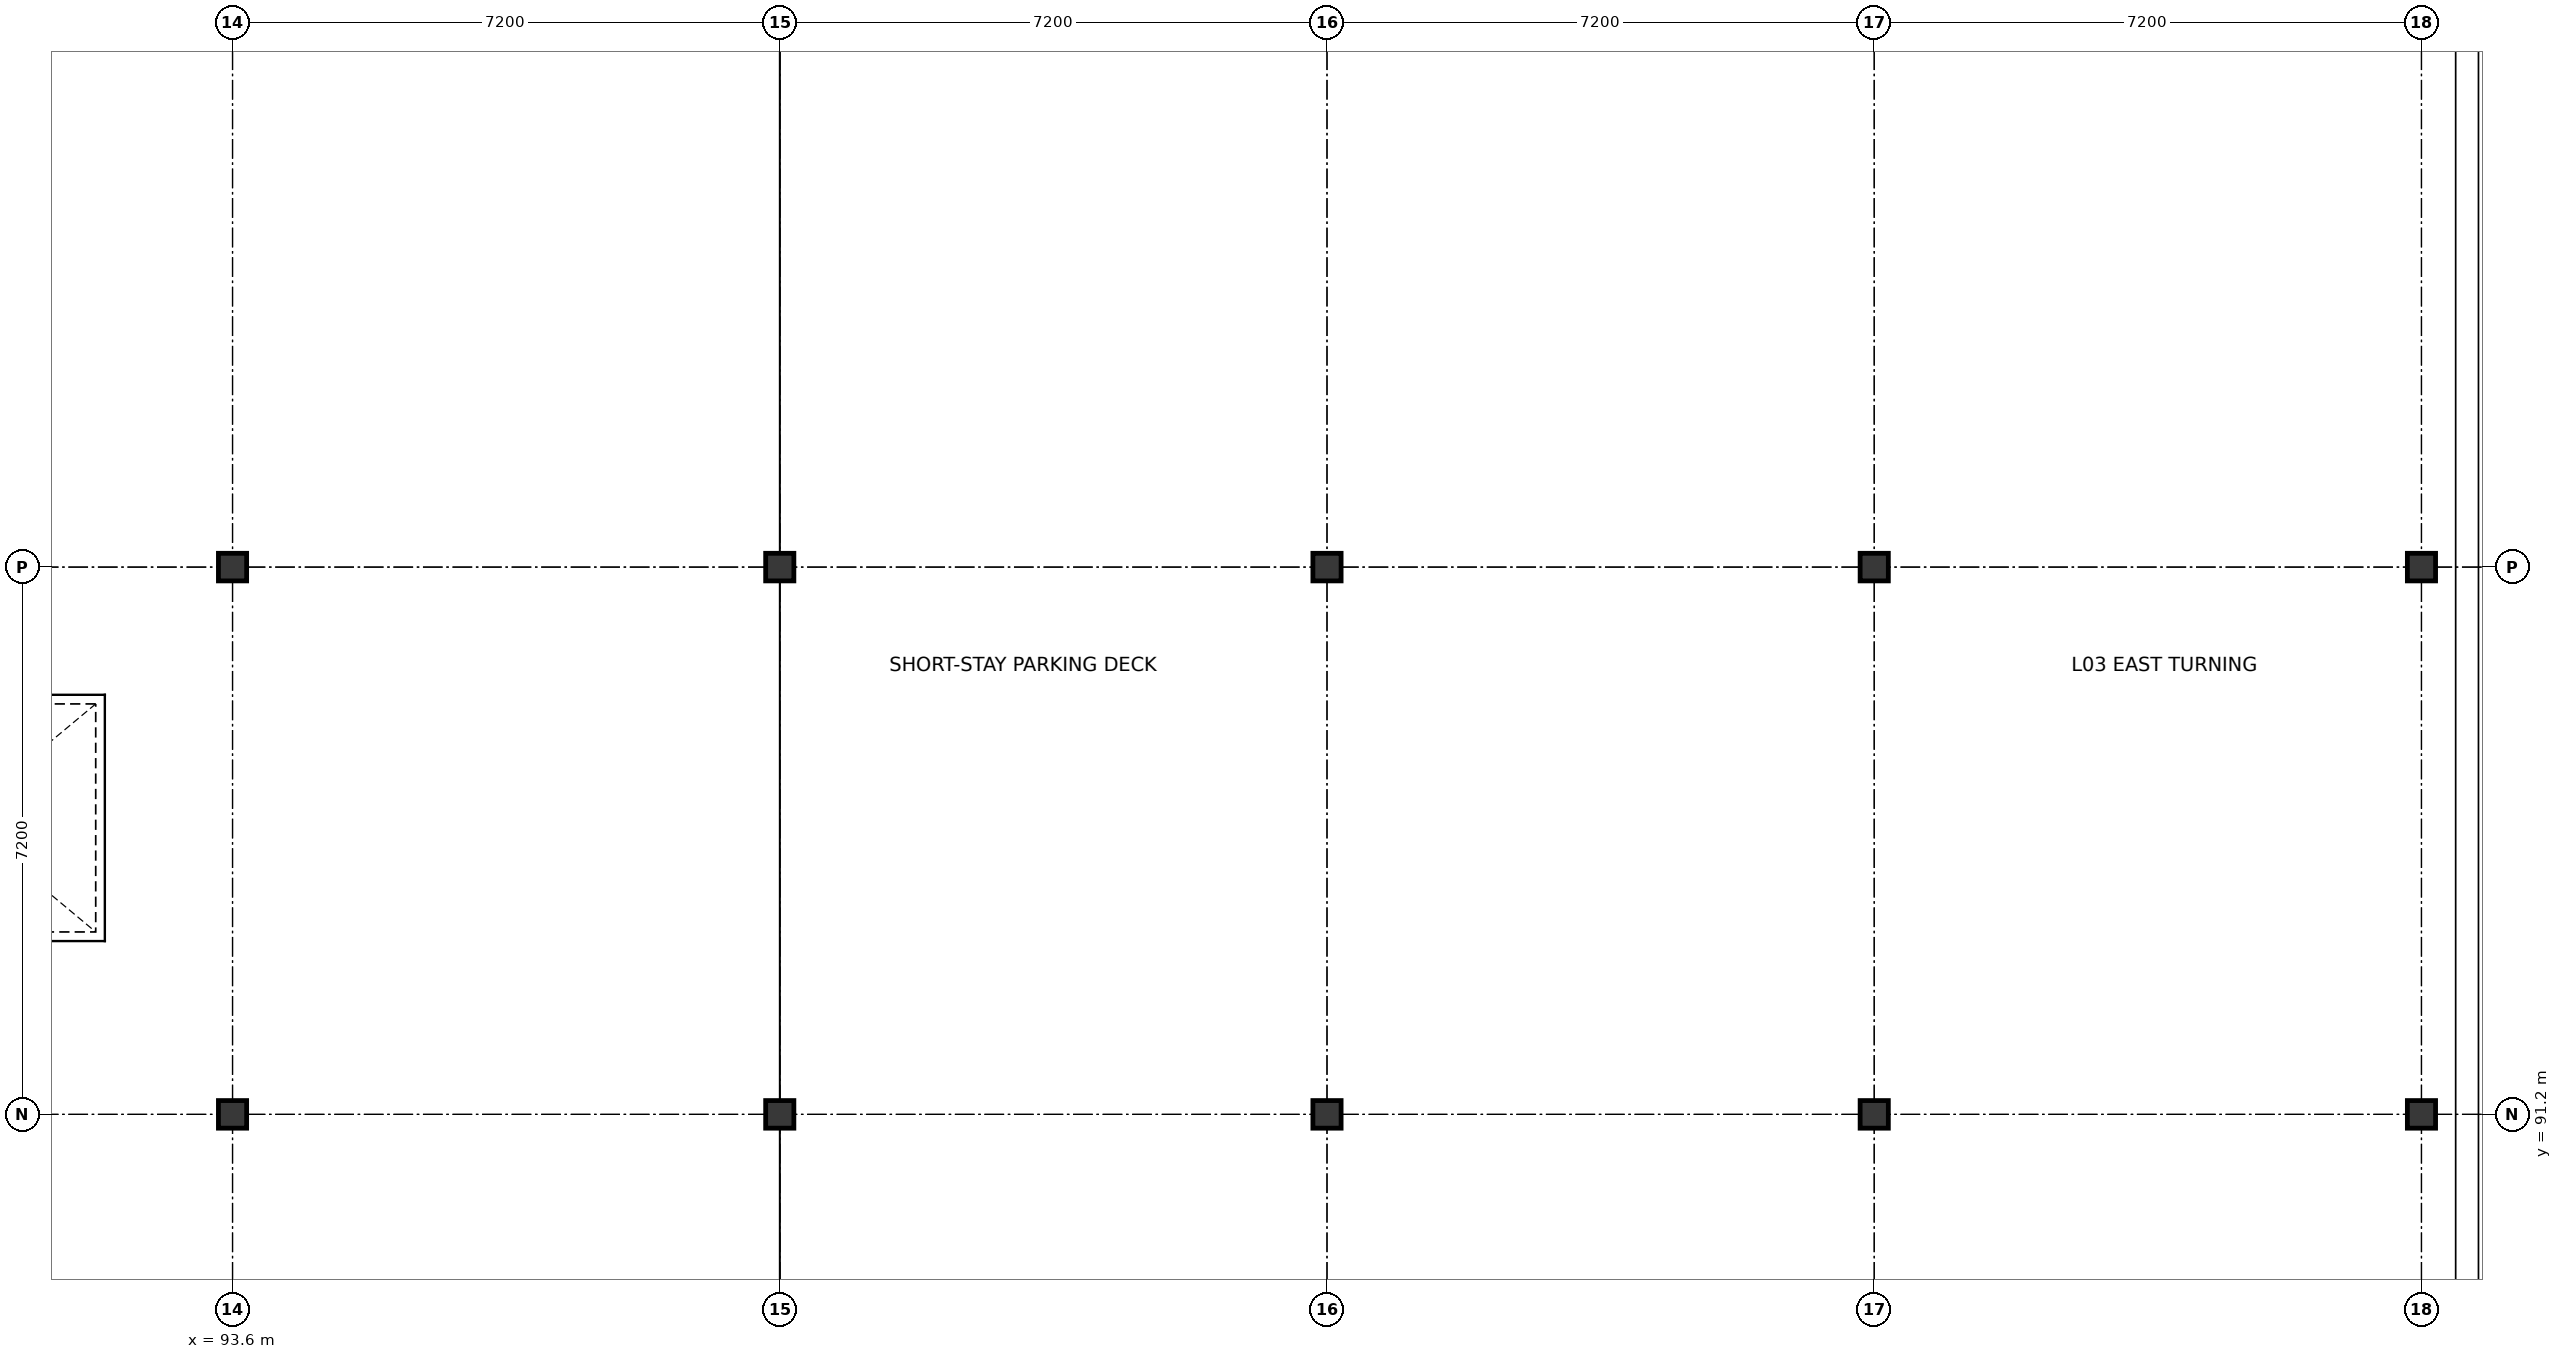
"""IFC4 building model, lengths in metres.
Left out: names, types, materials, properties, quantities, classifications, styles, units other than length and angle.
Written with IfcOpenShell. Run it as: python <this file> out.ifc"""

import sys

from ifc_helpers import new_model, si_unit, direction, frame, origin, origin_2d, place, context, subcontext, project, spatial, i_section, extrude, element, save


model = new_model("IFC4")
c1 = context("Model", 3, precision=1e-05, world=origin(), true_north=direction((0.0, 1.0)))
c2 = subcontext(c1, "Body", "Model", "MODEL_VIEW")
j1 = project(units=[si_unit("LENGTHUNIT", "METRE"), si_unit("PLANEANGLEUNIT", "RADIAN")], contexts=[c1])
p1 = place(None, origin())
s1 = spatial("IfcSite", under=j1, at=p1, CompositionType="ELEMENT")
p2 = place(p1, origin())
s2 = spatial("IfcBuilding", under=s1, at=p2, CompositionType="ELEMENT")
p3 = place(p2, frame((0.0, 0.0, 13.2)))
s3 = spatial("IfcBuildingStorey", under=s2, at=p3, CompositionType="ELEMENT", Elevation=13.2)
for number, where, z_axis, x_axis in (
    (1, (93.6, 91.2, 0.0), (0.0, 0.0, 1.0), (1.0, 0.0, 0.0)),
    (2, (93.6, 98.4, 0.0), (0.0, 0.0, 1.0), (1.0, 0.0, 0.0)),
    (3, (100.8, 91.2, 0.0), (0.0, 0.0, 1.0), (1.0, 0.0, 0.0)),
    (4, (100.8, 98.4, 0.0), (0.0, 0.0, 1.0), (1.0, 0.0, 0.0)),
    (5, (108.0, 91.2, 0.0), (0.0, 0.0, 1.0), (1.0, 0.0, 0.0)),
    (6, (108.0, 98.4, 0.0), (0.0, 0.0, 1.0), (1.0, 0.0, 0.0)),
    (7, (115.2, 91.2, 0.0), (0.0, 0.0, 1.0), (1.0, 0.0, 0.0)),
    (8, (115.2, 98.4, 0.0), (0.0, 0.0, 1.0), (1.0, 0.0, 0.0)),
    (9, (122.4, 91.2, 0.0), (0.0, 0.0, 1.0), (1.0, 0.0, 0.0)),
    (10, (122.4, 98.4, 0.0), (0.0, 0.0, 1.0), (1.0, 0.0, 0.0)),
):
    element("IfcColumn", number, at=place(p3, frame(where, z_axis=z_axis, x_axis=x_axis)), inside=s3, PredefinedType="COLUMN", context=c2, shape_type="SweptSolid", body=[
        extrude(i_section(OverallWidth=0.371, OverallDepth=0.363, WebThickness=0.013, FlangeThickness=0.022, FilletRadius=0.015, at=origin_2d()), origin(), (0.0, 0.0, 1.0), 3.9),
    ])
save(model, sys.argv[1])
